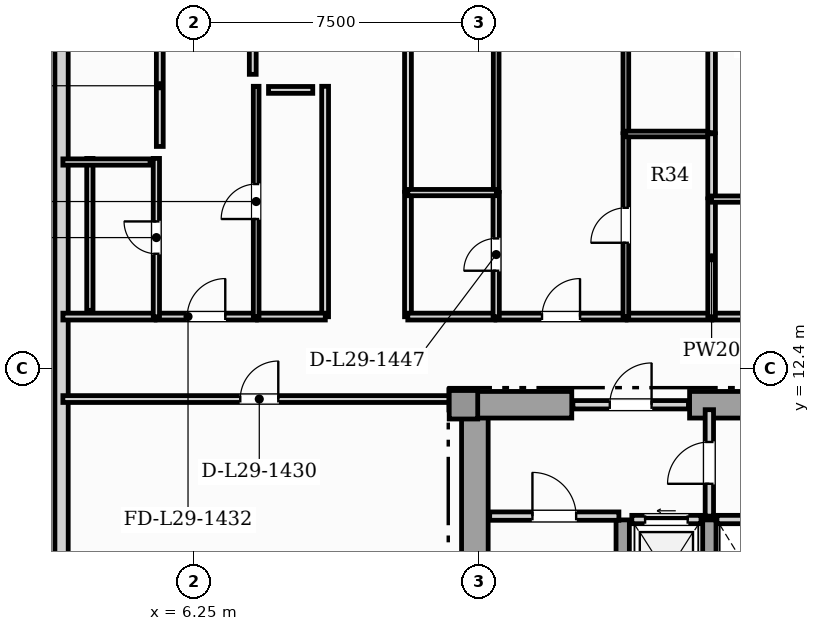
"""IFC4 building model, lengths in metres.
Left out: names, types, materials, properties, quantities, classifications, styles, units other than length and angle.
Written with IfcOpenShell. Run it as: python <this file> out.ifc"""

import sys

from ifc_helpers import new_model, si_unit, direction, frame, frame_2d, origin, origin_2d, place, context, subcontext, project, spatial, rectangle, extrude, element, fill, save


model = new_model("IFC4")
c1 = context("Model", 3, precision=1e-05, world=origin(), true_north=direction((0.0, 1.0)))
c2 = subcontext(c1, "Body", "Model", "MODEL_VIEW")
j1 = project(units=[si_unit("LENGTHUNIT", "METRE"), si_unit("PLANEANGLEUNIT", "RADIAN")], contexts=[c1])
p1 = place(None, origin())
s1 = spatial("IfcSite", under=j1, at=p1, CompositionType="ELEMENT")
p2 = place(p1, origin())
s2 = spatial("IfcBuilding", under=s1, at=p2, CompositionType="ELEMENT")
p3 = place(p2, frame((0.0, 0.0, 119.55)))
s3 = spatial("IfcBuildingStorey", under=s2, at=p3, CompositionType="ELEMENT", Elevation=119.55)
p4 = place(p3, frame((13.65, 0.92, 0.0), z_axis=(0.0, 0.0, 1.0), x_axis=(0.0, 1.0, 0.0)))
e1 = element("IfcWall", 1, at=p4, inside=s3, PredefinedType="SHEAR", context=c2, shape_type="SweptSolid", body=[
    extrude(rectangle(XDim=10.53, YDim=0.7, at=frame_2d((5.265, 0.0))), origin(), (0.0, 0.0, 1.0), 3.6),
])
p5 = place(p3, frame((13.25, 11.45, 0.0), z_axis=(0.0, 0.0, 1.0), x_axis=(1.0, 0.0, 0.0)))
e2 = element("IfcWall", 2, at=p5, inside=s3, PredefinedType="SHEAR", context=c2, shape_type="SweptSolid", body=[
    extrude(rectangle(XDim=2.95, YDim=0.7, at=frame_2d((1.475, 0.0))), origin(), (0.0, 0.0, 1.0), 3.6),
])
p6 = place(p3, frame((19.3, 11.45, 0.0), z_axis=(0.0, 0.0, 1.0), x_axis=(1.0, 0.0, 0.0)))
e3 = element("IfcWall", 3, at=p6, inside=s3, PredefinedType="SHEAR", context=c2, shape_type="SweptSolid", body=[
    extrude(rectangle(XDim=7.3, YDim=0.7, at=frame_2d((3.65, 0.0))), origin(), (0.0, 0.0, 1.0), 3.6),
])
for number, where, z_axis, x_axis in (
    (4, (17.54, 0.92, 0.0), (0.0, 0.0, 1.0), (0.0, 1.0, 0.0)),
    (5, (19.82, 0.92, 0.0), (0.0, 0.0, 1.0), (0.0, 1.0, 0.0)),
):
    element("IfcWall", number, at=place(p3, frame(where, z_axis=z_axis, x_axis=x_axis)), inside=s3, PredefinedType="SHEAR", context=c2, shape_type="SweptSolid", body=[
        extrude(rectangle(XDim=7.5, YDim=0.35, at=frame_2d((3.75, 0.0))), origin(), (0.0, 0.0, 1.0), 3.6),
    ])
p7 = place(p3, frame((13.35, 11.45, 0.0), z_axis=(0.0, 0.0, 1.0), x_axis=(1.0, 0.0, 0.0)))
e6 = element("IfcColumn", 6, at=p7, inside=s3, PredefinedType="COLUMN", context=c2, shape_type="SweptSolid", body=[
    extrude(rectangle(XDim=0.75, YDim=0.75, at=origin_2d()), origin(), (0.0, 0.0, 1.0), 3.85),
])
p8 = place(p3, frame((2.775, 21.61, 0.0), z_axis=(0.0, 0.0, 1.0), x_axis=(0.0, -1.0, 0.0)))
e7 = element("IfcWall", 7, at=p8, inside=s3, PredefinedType="SOLIDWALL", context=c2, shape_type="SweptSolid", body=[
    extrude(rectangle(XDim=18.37, YDim=0.35, at=frame_2d((9.185, 0.0))), origin(), (0.0, 0.0, 1.0), 3.6),
])
p9 = place(p3, frame((17.78, 8.43, 0.0), z_axis=(0.0, 0.0, 1.0), x_axis=(1.0, 0.0, 0.0)))
e8 = element("IfcWall", 8, at=p9, inside=s3, PredefinedType="SOLIDWALL", context=c2, shape_type="SweptSolid", body=[
    extrude(rectangle(XDim=1.82, YDim=0.22, at=frame_2d((0.91, 0.0))), origin(), (0.0, 0.0, 1.0), 3.6),
])
p10 = place(p9, frame((0.35, 0.0, 0.0)))
e9 = element("IfcOpeningElement", 9, at=p10, cuts=e8, PredefinedType="OPENING", context=c2, shape_type="SweptSolid", body=[
    extrude(rectangle(XDim=1.12, YDim=2.25, at=frame_2d((0.56, 1.125))), frame((0.0, 0.12, 0.0), z_axis=(0.0, -1.0, 0.0), x_axis=(1.0, 0.0, 0.0)), (0.0, 0.0, 1.0), 0.24),
])
p11 = place(p3, frame((20.02, 8.43, 0.0), z_axis=(0.0, 0.0, 1.0), x_axis=(1.0, 0.0, 0.0)))
e10 = element("IfcWall", 10, at=p11, inside=s3, PredefinedType="SOLIDWALL", context=c2, shape_type="SweptSolid", body=[
    extrude(rectangle(XDim=1.74, YDim=0.22, at=frame_2d((0.87, 0.0))), origin(), (0.0, 0.0, 1.0), 3.6),
])
p12 = place(p3, frame((14.04, 8.52, 0.0), z_axis=(0.0, 0.0, 1.0), x_axis=(1.0, 0.0, 0.0)))
e11 = element("IfcWall", 11, at=p12, inside=s3, PredefinedType="SOLIDWALL", context=c2, shape_type="SweptSolid", body=[
    extrude(rectangle(XDim=3.4, YDim=0.22, at=frame_2d((1.7, 0.0))), origin(), (0.0, 0.0, 1.0), 3.6),
])
p13 = place(p12, frame((1.125, 0.0, 0.0)))
e12 = element("IfcOpeningElement", 12, at=p13, cuts=e11, PredefinedType="OPENING", context=c2, shape_type="SweptSolid", body=[
    extrude(rectangle(XDim=1.15, YDim=2.2, at=frame_2d((0.575, 1.1))), frame((0.0, 0.12, 0.0), z_axis=(0.0, -1.0, 0.0), x_axis=(1.0, 0.0, 0.0)), (0.0, 0.0, 1.0), 0.24),
])
p14 = place(p3, frame((19.82, 8.52, 0.0), z_axis=(0.0, 0.0, 1.0), x_axis=(0.0, 1.0, 0.0)))
e13 = element("IfcWall", 13, at=p14, inside=s3, PredefinedType="SOLIDWALL", context=c2, shape_type="SweptSolid", body=[
    extrude(rectangle(XDim=2.8, YDim=0.22, at=frame_2d((1.4, 0.0))), origin(), (0.0, 0.0, 1.0), 3.055),
])
p15 = place(p14, frame((0.85, 0.0, 0.0)))
e14 = element("IfcOpeningElement", 14, at=p15, cuts=e13, PredefinedType="OPENING", context=c2, shape_type="SweptSolid", body=[
    extrude(rectangle(XDim=1.1, YDim=2.2, at=frame_2d((0.55, 1.1))), frame((0.0, 0.12, 0.0), z_axis=(0.0, -1.0, 0.0), x_axis=(1.0, 0.0, 0.0)), (0.0, 0.0, 1.0), 0.24),
])
p16 = place(p3, frame((16.23, 11.45, 0.0), z_axis=(0.0, 0.0, 1.0), x_axis=(1.0, 0.0, 0.0)))
e15 = element("IfcWall", 15, at=p16, inside=s3, PredefinedType="SOLIDWALL", context=c2, shape_type="SweptSolid", body=[
    extrude(rectangle(XDim=3.04, YDim=0.22, at=frame_2d((1.52, 0.0))), origin(), (0.0, 0.0, 1.0), 3.6),
])
p17 = place(p16, frame((0.97, 0.0, 0.0)))
e16 = element("IfcOpeningElement", 16, at=p17, cuts=e15, PredefinedType="OPENING", context=c2, shape_type="SweptSolid", body=[
    extrude(rectangle(XDim=1.1, YDim=2.2, at=frame_2d((0.55, 1.1))), frame((0.0, 0.12, 0.0), z_axis=(0.0, -1.0, 0.0), x_axis=(1.0, 0.0, 0.0)), (0.0, 0.0, 1.0), 0.24),
])
p18 = place(p3, frame((2.81, 11.6, 0.0), z_axis=(0.0, 0.0, 1.0), x_axis=(1.0, 0.0, 0.0)))
e17 = element("IfcWall", 17, at=p18, inside=s3, PredefinedType="PARTITIONING", context=c2, shape_type="SweptSolid", body=[
    extrude(rectangle(XDim=10.335, YDim=0.18, at=frame_2d((5.167, 0.0))), origin(), (0.0, 0.0, 1.0), 3.6),
])
p19 = place(p18, frame((4.667, 0.0, 0.0)))
e18 = element("IfcOpeningElement", 18, at=p19, cuts=e17, PredefinedType="OPENING", context=c2, shape_type="SweptSolid", body=[
    extrude(rectangle(XDim=1.0, YDim=2.15, at=frame_2d((0.5, 1.075))), frame((0.0, 0.1, 0.0), z_axis=(0.0, -1.0, 0.0), x_axis=(1.0, 0.0, 0.0)), (0.0, 0.0, 1.0), 0.2),
])
p20 = place(p3, frame((5.265, 13.77, 0.0), z_axis=(0.0, 0.0, 1.0), x_axis=(1.0, 0.0, 0.0)))
e19 = element("IfcWall", 19, at=p20, inside=s3, PredefinedType="PARTITIONING", context=c2, shape_type="SweptSolid", body=[
    extrude(rectangle(XDim=2.636, YDim=0.18, at=frame_2d((1.318, 0.0))), origin(), (0.0, 0.0, 1.0), 3.6),
])
p21 = place(p20, frame((0.818, 0.0, 0.0)))
e20 = element("IfcOpeningElement", 20, at=p21, cuts=e19, PredefinedType="OPENING", context=c2, shape_type="SweptSolid", body=[
    extrude(rectangle(XDim=1.0, YDim=2.15, at=frame_2d((0.5, 1.075))), frame((0.0, 0.1, 0.0), z_axis=(0.0, -1.0, 0.0), x_axis=(1.0, 0.0, 0.0)), (0.0, 0.0, 1.0), 0.2),
])
p22 = place(p3, frame((2.81, 13.77, 0.0), z_axis=(0.0, 0.0, 1.0), x_axis=(1.0, 0.0, 0.0)))
e21 = element("IfcWall", 21, at=p22, inside=s3, PredefinedType="PARTITIONING", context=c2, shape_type="SweptSolid", body=[
    extrude(rectangle(XDim=2.425, YDim=0.18, at=frame_2d((1.212, 0.0))), origin(), (0.0, 0.0, 1.0), 3.6),
])
p23 = place(p3, frame((9.71, 13.765, 0.0), z_axis=(0.0, 0.0, 1.0), x_axis=(0.0, 1.0, 0.0)))
e22 = element("IfcWall", 22, at=p23, inside=s3, PredefinedType="PARTITIONING", context=c2, shape_type="SweptSolid", body=[
    extrude(rectangle(XDim=6.064, YDim=0.18, at=frame_2d((3.032, 0.0))), origin(), (0.0, 0.0, 1.0), 3.6),
])
p24 = place(p3, frame((7.931, 13.77, 0.0), z_axis=(0.0, 0.0, 1.0), x_axis=(1.0, 0.0, 0.0)))
e23 = element("IfcWall", 23, at=p24, inside=s3, PredefinedType="PARTITIONING", context=c2, shape_type="SweptSolid", body=[
    extrude(rectangle(XDim=1.784, YDim=0.18, at=frame_2d((0.892, 0.0))), origin(), (0.0, 0.0, 1.0), 3.6),
])
p25 = place(p3, frame((14.206, 13.77, 0.0), z_axis=(0.0, 0.0, 1.0), x_axis=(1.0, 0.0, 0.0)))
e24 = element("IfcWall", 24, at=p25, inside=s3, PredefinedType="PARTITIONING", context=c2, shape_type="SweptSolid", body=[
    extrude(rectangle(XDim=3.422, YDim=0.18, at=frame_2d((1.711, 0.0))), origin(), (0.0, 0.0, 1.0), 3.6),
])
p26 = place(p25, frame((1.211, 0.0, 0.0)))
e25 = element("IfcOpeningElement", 25, at=p26, cuts=e24, PredefinedType="OPENING", context=c2, shape_type="SweptSolid", body=[
    extrude(rectangle(XDim=1.0, YDim=2.15, at=frame_2d((0.5, 1.075))), frame((0.0, 0.1, 0.0), z_axis=(0.0, -1.0, 0.0), x_axis=(1.0, 0.0, 0.0)), (0.0, 0.0, 1.0), 0.2),
])
p27 = place(p3, frame((11.89, 13.765, 0.0), z_axis=(0.0, 0.0, 1.0), x_axis=(0.0, 1.0, 0.0)))
e26 = element("IfcWall", 26, at=p27, inside=s3, PredefinedType="PARTITIONING", context=c2, shape_type="SweptSolid", body=[
    extrude(rectangle(XDim=3.273, YDim=0.18, at=frame_2d((1.636, 0.0))), origin(), (0.0, 0.0, 1.0), 3.6),
])
p28 = place(p3, frame((11.885, 13.77, 0.0), z_axis=(0.0, 0.0, 1.0), x_axis=(1.0, 0.0, 0.0)))
e27 = element("IfcWall", 27, at=p28, inside=s3, PredefinedType="PARTITIONING", context=c2, shape_type="SweptSolid", body=[
    extrude(rectangle(XDim=2.291, YDim=0.18, at=frame_2d((1.146, 0.0))), origin(), (0.0, 0.0, 1.0), 3.6),
])
p29 = place(p3, frame((11.89, 17.068, 0.0), z_axis=(0.0, 0.0, 1.0), x_axis=(0.0, 1.0, 0.0)))
e28 = element("IfcWall", 28, at=p29, inside=s3, PredefinedType="PARTITIONING", context=c2, shape_type="SweptSolid", body=[
    extrude(rectangle(XDim=10.827, YDim=0.18, at=frame_2d((5.414, 0.0))), origin(), (0.0, 0.0, 1.0), 3.6),
])
p30 = place(p3, frame((17.658, 13.77, 0.0), z_axis=(0.0, 0.0, 1.0), x_axis=(1.0, 0.0, 0.0)))
e29 = element("IfcWall", 29, at=p30, inside=s3, PredefinedType="PARTITIONING", context=c2, shape_type="SweptSolid", body=[
    extrude(rectangle(XDim=2.226, YDim=0.18, at=frame_2d((1.113, 0.0))), origin(), (0.0, 0.0, 1.0), 3.6),
])
p31 = place(p3, frame((19.914, 13.77, 0.0), z_axis=(0.0, 0.0, 1.0), x_axis=(1.0, 0.0, 0.0)))
e30 = element("IfcWall", 30, at=p31, inside=s3, PredefinedType="PARTITIONING", context=c2, shape_type="SweptSolid", body=[
    extrude(rectangle(XDim=2.377, YDim=0.18, at=frame_2d((1.188, 0.0))), origin(), (0.0, 0.0, 1.0), 3.6),
])
p32 = place(p3, frame((5.27, 13.765, 0.0), z_axis=(0.0, 0.0, 1.0), x_axis=(0.0, 1.0, 0.0)))
e31 = element("IfcWall", 31, at=p32, inside=s3, PredefinedType="PLUMBINGWALL", context=c2, shape_type="SweptSolid", body=[
    extrude(rectangle(XDim=4.167, YDim=0.165, at=frame_2d((2.083, 0.0))), origin(), (0.0, 0.0, 1.0), 3.6),
])
p33 = place(p32, frame((1.658, 0.0, 0.0)))
e32 = element("IfcOpeningElement", 32, at=p33, cuts=e31, PredefinedType="OPENING", context=c2, shape_type="SweptSolid", body=[
    extrude(rectangle(XDim=0.85, YDim=2.1, at=frame_2d((0.425, 1.05))), frame((0.0, 0.093, 0.0), z_axis=(0.0, -1.0, 0.0), x_axis=(1.0, 0.0, 0.0)), (0.0, 0.0, 1.0), 0.185),
])
p34 = place(p3, frame((7.896, 13.765, 0.0), z_axis=(0.0, 0.0, 1.0), x_axis=(0.0, 1.0, 0.0)))
e33 = element("IfcWall", 33, at=p34, inside=s3, PredefinedType="PARTITIONING", context=c2, shape_type="SweptSolid", body=[
    extrude(rectangle(XDim=6.064, YDim=0.15, at=frame_2d((3.032, 0.0))), origin(), (0.0, 0.0, 1.0), 3.055),
])
p35 = place(p34, frame((2.572, 0.0, 0.0)))
e34 = element("IfcOpeningElement", 34, at=p35, cuts=e33, PredefinedType="OPENING", context=c2, shape_type="SweptSolid", body=[
    extrude(rectangle(XDim=0.92, YDim=2.1, at=frame_2d((0.46, 1.05))), frame((0.0, 0.085, 0.0), z_axis=(0.0, -1.0, 0.0), x_axis=(1.0, 0.0, 0.0)), (0.0, 0.0, 1.0), 0.17),
])
p36 = place(p3, frame((14.211, 13.765, 0.0), z_axis=(0.0, 0.0, 1.0), x_axis=(0.0, 1.0, 0.0)))
e35 = element("IfcWall", 35, at=p36, inside=s3, PredefinedType="PLUMBINGWALL", context=c2, shape_type="SweptSolid", body=[
    extrude(rectangle(XDim=3.273, YDim=0.165, at=frame_2d((1.636, 0.0))), origin(), (0.0, 0.0, 1.0), 3.6),
])
p37 = place(p36, frame((1.211, 0.0, 0.0)))
e36 = element("IfcOpeningElement", 36, at=p37, cuts=e35, PredefinedType="OPENING", context=c2, shape_type="SweptSolid", body=[
    extrude(rectangle(XDim=0.85, YDim=2.1, at=frame_2d((0.425, 1.05))), frame((0.0, 0.093, 0.0), z_axis=(0.0, -1.0, 0.0), x_axis=(1.0, 0.0, 0.0)), (0.0, 0.0, 1.0), 0.185),
])
p38 = place(p3, frame((14.211, 17.068, 0.0), z_axis=(0.0, 0.0, 1.0), x_axis=(0.0, 1.0, 0.0)))
e37 = element("IfcWall", 37, at=p38, inside=s3, PredefinedType="PARTITIONING", context=c2, shape_type="SweptSolid", body=[
    extrude(rectangle(XDim=16.437, YDim=0.15, at=frame_2d((8.219, 0.0))), origin(), (0.0, 0.0, 1.0), 3.6),
])
p39 = place(p38, frame((7.759, 0.0, 0.0)))
e38 = element("IfcOpeningElement", 38, at=p39, cuts=e37, PredefinedType="OPENING", context=c2, shape_type="SweptSolid", body=[
    extrude(rectangle(XDim=0.92, YDim=2.1, at=frame_2d((0.46, 1.05))), frame((0.0, 0.085, 0.0), z_axis=(0.0, -1.0, 0.0), x_axis=(1.0, 0.0, 0.0)), (0.0, 0.0, 1.0), 0.17),
])
p40 = place(p3, frame((17.623, 13.765, 0.0), z_axis=(0.0, 0.0, 1.0), x_axis=(0.0, 1.0, 0.0)))
e39 = element("IfcWall", 39, at=p40, inside=s3, PredefinedType="PARTITIONING", context=c2, shape_type="SweptSolid", body=[
    extrude(rectangle(XDim=4.814, YDim=0.15, at=frame_2d((2.407, 0.0))), origin(), (0.0, 0.0, 1.0), 3.6),
])
p41 = place(p40, frame((1.947, 0.0, 0.0)))
e40 = element("IfcOpeningElement", 40, at=p41, cuts=e39, PredefinedType="OPENING", context=c2, shape_type="SweptSolid", body=[
    extrude(rectangle(XDim=0.92, YDim=2.1, at=frame_2d((0.46, 1.05))), frame((0.0, 0.085, 0.0), z_axis=(0.0, -1.0, 0.0), x_axis=(1.0, 0.0, 0.0)), (0.0, 0.0, 1.0), 0.17),
])
p42 = place(p3, frame((17.623, 18.609, 0.0), z_axis=(0.0, 0.0, 1.0), x_axis=(0.0, 1.0, 0.0)))
e41 = element("IfcWall", 41, at=p42, inside=s3, PredefinedType="PARTITIONING", context=c2, shape_type="SweptSolid", body=[
    extrude(rectangle(XDim=14.896, YDim=0.15, at=frame_2d((7.448, 0.0))), origin(), (0.0, 0.0, 1.0), 3.6),
])
p43 = place(p42, frame((6.988, 0.0, 0.0)))
e42 = element("IfcOpeningElement", 42, at=p43, cuts=e41, PredefinedType="OPENING", context=c2, shape_type="SweptSolid", body=[
    extrude(rectangle(XDim=0.92, YDim=2.1, at=frame_2d((0.46, 1.05))), frame((0.0, 0.085, 0.0), z_axis=(0.0, -1.0, 0.0), x_axis=(1.0, 0.0, 0.0)), (0.0, 0.0, 1.0), 0.17),
])
p44 = place(p3, frame((11.885, 17.033, 0.0), z_axis=(0.0, 0.0, 1.0), x_axis=(1.0, 0.0, 0.0)))
e43 = element("IfcWall", 43, at=p44, inside=s3, PredefinedType="PLUMBINGWALL", context=c2, shape_type="SweptSolid", body=[
    extrude(rectangle(XDim=2.331, YDim=0.165, at=frame_2d((1.166, 0.0))), origin(), (0.0, 0.0, 1.0), 3.6),
])
p45 = place(p3, frame((17.618, 18.574, 0.0), z_axis=(0.0, 0.0, 1.0), x_axis=(1.0, 0.0, 0.0)))
e44 = element("IfcWall", 44, at=p45, inside=s3, PredefinedType="PARTITIONING", context=c2, shape_type="SweptSolid", body=[
    extrude(rectangle(XDim=2.266, YDim=0.15, at=frame_2d((1.133, 0.0))), origin(), (0.0, 0.0, 1.0), 3.6),
])
p46 = place(p3, frame((19.879, 13.765, 0.0), z_axis=(0.0, 0.0, 1.0), x_axis=(0.0, 1.0, 0.0)))
e45 = element("IfcWall", 45, at=p46, inside=s3, PredefinedType="PARTITIONING", context=c2, shape_type="SweptSolid", body=[
    extrude(rectangle(XDim=3.101, YDim=0.2, at=frame_2d((1.551, 0.0))), origin(), (0.0, 0.0, 1.0), 3.6),
])
p47 = place(p3, frame((19.879, 16.896, 0.0), z_axis=(0.0, 0.0, 1.0), x_axis=(0.0, 1.0, 0.0)))
e46 = element("IfcWall", 46, at=p47, inside=s3, PredefinedType="PARTITIONING", context=c2, shape_type="SweptSolid", body=[
    extrude(rectangle(XDim=1.683, YDim=0.2, at=frame_2d((0.842, 0.0))), origin(), (0.0, 0.0, 1.0), 3.6),
])
p48 = place(p3, frame((19.879, 18.609, 0.0), z_axis=(0.0, 0.0, 1.0), x_axis=(0.0, 1.0, 0.0)))
e47 = element("IfcWall", 47, at=p48, inside=s3, PredefinedType="PARTITIONING", context=c2, shape_type="SweptSolid", body=[
    extrude(rectangle(XDim=14.856, YDim=0.2, at=frame_2d((7.428, 0.0))), origin(), (0.0, 0.0, 1.0), 3.6),
])
p49 = place(p3, frame((19.874, 16.861, 0.0), z_axis=(0.0, 0.0, 1.0), x_axis=(1.0, 0.0, 0.0)))
e48 = element("IfcWall", 48, at=p49, inside=s3, PredefinedType="PLUMBINGWALL", context=c2, shape_type="SweptSolid", body=[
    extrude(rectangle(XDim=2.457, YDim=0.165, at=frame_2d((1.229, 0.0))), origin(), (0.0, 0.0, 1.0), 3.6),
])
p50 = place(p3, frame((5.36, 18.247, 0.0), z_axis=(0.0, 0.0, 1.0), x_axis=(0.0, 1.0, 0.0)))
e49 = element("IfcWall", 49, at=p50, inside=s3, PredefinedType="PARTITIONING", context=c2, shape_type="SweptSolid", body=[
    extrude(rectangle(XDim=3.193, YDim=0.18, at=frame_2d((1.597, 0.0))), origin(), (0.0, 0.0, 1.0), 3.6),
])
p51 = place(p3, frame((7.806, 33.685, 0.0), z_axis=(0.0, 0.0, 1.0), x_axis=(0.0, -1.0, 0.0)))
e50 = element("IfcWall", 50, at=p51, inside=s3, PredefinedType="PARTITIONING", context=c2, shape_type="SweptSolid", body=[
    extrude(rectangle(XDim=13.541, YDim=0.18, at=frame_2d((6.771, 0.0))), origin(), (0.0, 0.0, 1.0), 3.055),
])
p52 = place(p3, frame((3.52, 13.935, 0.0), z_axis=(0.0, 0.0, 1.0), x_axis=(0.0, 1.0, 0.0)))
e51 = element("IfcWall", 51, at=p52, inside=s3, PredefinedType="PLUMBINGWALL", context=c2, shape_type="SweptSolid", body=[
    extrude(rectangle(XDim=3.997, YDim=0.165, at=frame_2d((1.998, 0.0))), origin(), (0.0, 0.0, 1.0), 3.6),
])
p53 = place(p3, frame((2.81, 17.837, 0.0), z_axis=(0.0, 0.0, 1.0), x_axis=(1.0, 0.0, 0.0)))
e52 = element("IfcWall", 52, at=p53, inside=s3, PredefinedType="PLUMBINGWALL", context=c2, shape_type="SweptSolid", body=[
    extrude(rectangle(XDim=2.295, YDim=0.165, at=frame_2d((1.147, 0.0))), origin(), (0.0, 0.0, 1.0), 3.6),
])
p54 = place(p3, frame((8.221, 19.734, 0.0), z_axis=(0.0, 0.0, 1.0), x_axis=(1.0, 0.0, 0.0)))
e53 = element("IfcWall", 53, at=p54, inside=s3, PredefinedType="PARTITIONING", context=c2, shape_type="SweptSolid", body=[
    extrude(rectangle(XDim=1.164, YDim=0.18, at=frame_2d((0.582, 0.0))), origin(), (0.0, 0.0, 1.0), 3.6),
])
p55 = place(p10, origin())
e54 = element("IfcDoor", 54, at=p55, inside=s3, OperationType="SLIDING_TO_LEFT", PredefinedType="DOOR", context=c2, shape_type="SweptSolid", body=[
    extrude(rectangle(XDim=1.12, YDim=2.25, at=frame_2d((0.56, 1.125))), frame((0.0, 0.025, 0.0), z_axis=(0.0, -1.0, 0.0), x_axis=(1.0, 0.0, 0.0)), (0.0, 0.0, 1.0), 0.05),
])
fill(e9, e54)
p56 = place(p13, origin())
e55 = element("IfcDoor", 55, at=p56, inside=s3, OperationType="SINGLE_SWING_LEFT", PredefinedType="DOOR", context=c2, shape_type="SweptSolid", body=[
    extrude(rectangle(XDim=1.15, YDim=2.2, at=frame_2d((0.575, 1.1))), frame((0.0, 0.025, 0.0), z_axis=(0.0, -1.0, 0.0), x_axis=(1.0, 0.0, 0.0)), (0.0, 0.0, 1.0), 0.05),
])
fill(e12, e55)
p57 = place(p15, origin())
e56 = element("IfcDoor", 56, at=p57, inside=s3, OperationType="SINGLE_SWING_LEFT", PredefinedType="DOOR", context=c2, shape_type="SweptSolid", body=[
    extrude(rectangle(XDim=1.1, YDim=2.2, at=frame_2d((0.55, 1.1))), frame((0.0, 0.025, 0.0), z_axis=(0.0, -1.0, 0.0), x_axis=(1.0, 0.0, 0.0)), (0.0, 0.0, 1.0), 0.05),
])
fill(e14, e56)
p58 = place(p17, origin())
e57 = element("IfcDoor", 57, at=p58, inside=s3, OperationType="SINGLE_SWING_RIGHT", PredefinedType="DOOR", context=c2, shape_type="SweptSolid", body=[
    extrude(rectangle(XDim=1.1, YDim=2.2, at=frame_2d((0.55, 1.1))), frame((0.0, 0.025, 0.0), z_axis=(0.0, -1.0, 0.0), x_axis=(1.0, 0.0, 0.0)), (0.0, 0.0, 1.0), 0.05),
])
fill(e16, e57)
p59 = place(p19, origin())
e58 = element("IfcDoor", 58, at=p59, inside=s3, OperationType="SINGLE_SWING_RIGHT", PredefinedType="DOOR", context=c2, shape_type="SweptSolid", body=[
    extrude(rectangle(XDim=1.0, YDim=2.15, at=frame_2d((0.5, 1.075))), frame((0.0, 0.025, 0.0), z_axis=(0.0, -1.0, 0.0), x_axis=(1.0, 0.0, 0.0)), (0.0, 0.0, 1.0), 0.05),
])
fill(e18, e58)
p60 = place(p21, origin())
e59 = element("IfcDoor", 59, at=p60, inside=s3, OperationType="SINGLE_SWING_RIGHT", PredefinedType="DOOR", context=c2, shape_type="SweptSolid", body=[
    extrude(rectangle(XDim=1.0, YDim=2.15, at=frame_2d((0.5, 1.075))), frame((0.0, 0.025, 0.0), z_axis=(0.0, -1.0, 0.0), x_axis=(1.0, 0.0, 0.0)), (0.0, 0.0, 1.0), 0.05),
])
fill(e20, e59)
p61 = place(p26, origin())
e60 = element("IfcDoor", 60, at=p61, inside=s3, OperationType="SINGLE_SWING_RIGHT", PredefinedType="DOOR", context=c2, shape_type="SweptSolid", body=[
    extrude(rectangle(XDim=1.0, YDim=2.15, at=frame_2d((0.5, 1.075))), frame((0.0, 0.025, 0.0), z_axis=(0.0, -1.0, 0.0), x_axis=(1.0, 0.0, 0.0)), (0.0, 0.0, 1.0), 0.05),
])
fill(e25, e60)
p62 = place(p33, origin())
e61 = element("IfcDoor", 61, at=p62, inside=s3, OperationType="SINGLE_SWING_RIGHT", PredefinedType="DOOR", context=c2, shape_type="SweptSolid", body=[
    extrude(rectangle(XDim=0.85, YDim=2.1, at=frame_2d((0.425, 1.05))), frame((0.0, 0.025, 0.0), z_axis=(0.0, -1.0, 0.0), x_axis=(1.0, 0.0, 0.0)), (0.0, 0.0, 1.0), 0.05),
])
fill(e32, e61)
p63 = place(p35, origin())
e62 = element("IfcDoor", 62, at=p63, inside=s3, OperationType="SINGLE_SWING_LEFT", PredefinedType="DOOR", context=c2, shape_type="SweptSolid", body=[
    extrude(rectangle(XDim=0.92, YDim=2.1, at=frame_2d((0.46, 1.05))), frame((0.0, 0.025, 0.0), z_axis=(0.0, -1.0, 0.0), x_axis=(1.0, 0.0, 0.0)), (0.0, 0.0, 1.0), 0.05),
])
fill(e34, e62)
p64 = place(p37, origin())
e63 = element("IfcDoor", 63, at=p64, inside=s3, OperationType="SINGLE_SWING_LEFT", PredefinedType="DOOR", context=c2, shape_type="SweptSolid", body=[
    extrude(rectangle(XDim=0.85, YDim=2.1, at=frame_2d((0.425, 1.05))), frame((0.0, 0.025, 0.0), z_axis=(0.0, -1.0, 0.0), x_axis=(1.0, 0.0, 0.0)), (0.0, 0.0, 1.0), 0.05),
])
fill(e36, e63)
p65 = place(p41, origin())
e64 = element("IfcDoor", 64, at=p65, inside=s3, OperationType="SINGLE_SWING_LEFT", PredefinedType="DOOR", context=c2, shape_type="SweptSolid", body=[
    extrude(rectangle(XDim=0.92, YDim=2.1, at=frame_2d((0.46, 1.05))), frame((0.0, 0.025, 0.0), z_axis=(0.0, -1.0, 0.0), x_axis=(1.0, 0.0, 0.0)), (0.0, 0.0, 1.0), 0.05),
])
fill(e40, e64)
save(model, sys.argv[1])
